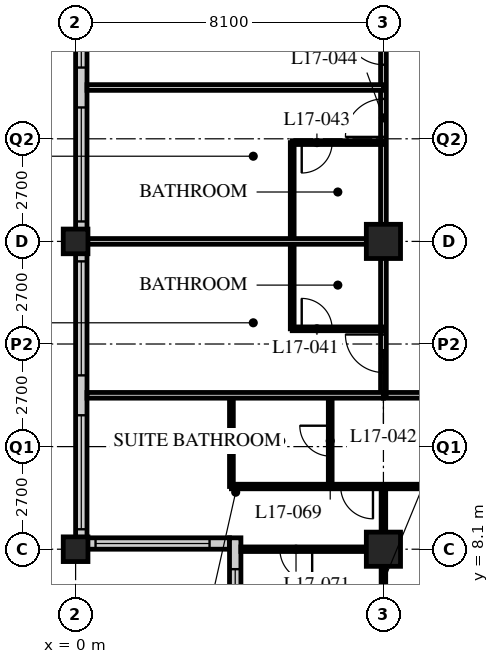
"""IFC4 building model, lengths in metres.
Left out: names, types, materials, properties, quantities, classifications, styles, units other than length and angle.
Written with IfcOpenShell. Run it as: python <this file> out.ifc"""

import sys

from ifc_helpers import new_model, si_unit, direction, frame, frame_2d, origin, origin_2d, place, context, subcontext, project, spatial, rectangle, hollow_rectangle, extrude, element, fill, save


model = new_model("IFC4")
c1 = context("Model", 3, precision=1e-05, world=origin(), true_north=direction((0.0, 1.0)))
c2 = subcontext(c1, "Body", "Model", "MODEL_VIEW")
j1 = project(units=[si_unit("LENGTHUNIT", "METRE"), si_unit("PLANEANGLEUNIT", "RADIAN")], contexts=[c1])
p1 = place(None, origin())
s1 = spatial("IfcSite", under=j1, at=p1, CompositionType="ELEMENT")
p2 = place(p1, origin())
s2 = spatial("IfcBuilding", under=s1, at=p2, CompositionType="ELEMENT")
p3 = place(p2, frame((0.0, 0.0, 70.4)))
s3 = spatial("IfcBuildingStorey", under=s2, at=p3, CompositionType="ELEMENT", Elevation=70.4)
for number, where, z_axis, x_axis in (
    (1, (0.0, 8.1, 0.0), (0.0, 0.0, 1.0), (1.0, 0.0, 0.0)),
    (2, (0.0, 16.2, 0.0), (0.0, 0.0, 1.0), (1.0, 0.0, 0.0)),
):
    element("IfcColumn", number, at=place(p3, frame(where, z_axis=z_axis, x_axis=x_axis)), inside=s3, PredefinedType="COLUMN", context=c2, shape_type="SweptSolid", body=[
        extrude(hollow_rectangle(XDim=0.65, YDim=0.65, WallThickness=0.05, at=origin_2d()), origin(), (0.0, 0.0, 1.0), 3.4),
    ])
for number, where, z_axis, x_axis in (
    (3, (8.1, 8.1, 0.0), (0.0, 0.0, 1.0), (1.0, 0.0, 0.0)),
    (4, (8.1, 16.2, 0.0), (0.0, 0.0, 1.0), (1.0, 0.0, 0.0)),
):
    element("IfcColumn", number, at=place(p3, frame(where, z_axis=z_axis, x_axis=x_axis)), inside=s3, PredefinedType="COLUMN", context=c2, shape_type="SweptSolid", body=[
        extrude(hollow_rectangle(XDim=0.9, YDim=0.9, WallThickness=0.09, at=origin_2d()), origin(), (0.0, 0.0, 1.0), 3.4),
    ])
p4 = place(p3, frame((0.15, 40.2, 0.0), z_axis=(0.0, 0.0, 1.0), x_axis=(0.0, -1.0, 0.0)))
e5 = element("IfcWall", 5, at=p4, inside=s3, PredefinedType="SOLIDWALL", context=c2, shape_type="SweptSolid", body=[
    extrude(rectangle(XDim=32.1, YDim=0.3, at=frame_2d((16.05, 0.0))), origin(), (0.0, 0.0, 1.0), 3.19),
])
p5 = place(p4, frame((0.225, 0.0, 0.9)))
e6 = element("IfcOpeningElement", 6, at=p5, cuts=e5, PredefinedType="OPENING", context=c2, shape_type="SweptSolid", body=[
    extrude(rectangle(XDim=3.0, YDim=2.0, at=frame_2d((1.5, 1.0))), frame((0.0, 0.16, 0.0), z_axis=(0.0, -1.0, 0.0), x_axis=(1.0, 0.0, 0.0)), (0.0, 0.0, 1.0), 0.32),
])
p6 = place(p4, frame((4.275, 0.0, 0.9)))
e7 = element("IfcOpeningElement", 7, at=p6, cuts=e5, PredefinedType="OPENING", context=c2, shape_type="SweptSolid", body=[
    extrude(rectangle(XDim=3.0, YDim=2.0, at=frame_2d((1.5, 1.0))), frame((0.0, 0.16, 0.0), z_axis=(0.0, -1.0, 0.0), x_axis=(1.0, 0.0, 0.0)), (0.0, 0.0, 1.0), 0.32),
])
p7 = place(p4, frame((8.325, 0.0, 0.9)))
e8 = element("IfcOpeningElement", 8, at=p7, cuts=e5, PredefinedType="OPENING", context=c2, shape_type="SweptSolid", body=[
    extrude(rectangle(XDim=3.0, YDim=2.0, at=frame_2d((1.5, 1.0))), frame((0.0, 0.16, 0.0), z_axis=(0.0, -1.0, 0.0), x_axis=(1.0, 0.0, 0.0)), (0.0, 0.0, 1.0), 0.32),
])
p8 = place(p4, frame((12.375, 0.0, 0.9)))
e9 = element("IfcOpeningElement", 9, at=p8, cuts=e5, PredefinedType="OPENING", context=c2, shape_type="SweptSolid", body=[
    extrude(rectangle(XDim=3.0, YDim=2.0, at=frame_2d((1.5, 1.0))), frame((0.0, 0.16, 0.0), z_axis=(0.0, -1.0, 0.0), x_axis=(1.0, 0.0, 0.0)), (0.0, 0.0, 1.0), 0.32),
])
p9 = place(p4, frame((16.425, 0.0, 0.9)))
e10 = element("IfcOpeningElement", 10, at=p9, cuts=e5, PredefinedType="OPENING", context=c2, shape_type="SweptSolid", body=[
    extrude(rectangle(XDim=3.0, YDim=2.0, at=frame_2d((1.5, 1.0))), frame((0.0, 0.16, 0.0), z_axis=(0.0, -1.0, 0.0), x_axis=(1.0, 0.0, 0.0)), (0.0, 0.0, 1.0), 0.32),
])
p10 = place(p4, frame((20.475, 0.0, 0.9)))
e11 = element("IfcOpeningElement", 11, at=p10, cuts=e5, PredefinedType="OPENING", context=c2, shape_type="SweptSolid", body=[
    extrude(rectangle(XDim=3.0, YDim=2.0, at=frame_2d((1.5, 1.0))), frame((0.0, 0.16, 0.0), z_axis=(0.0, -1.0, 0.0), x_axis=(1.0, 0.0, 0.0)), (0.0, 0.0, 1.0), 0.32),
])
p11 = place(p4, frame((24.525, 0.0, 0.9)))
e12 = element("IfcOpeningElement", 12, at=p11, cuts=e5, PredefinedType="OPENING", context=c2, shape_type="SweptSolid", body=[
    extrude(rectangle(XDim=3.0, YDim=2.0, at=frame_2d((1.5, 1.0))), frame((0.0, 0.16, 0.0), z_axis=(0.0, -1.0, 0.0), x_axis=(1.0, 0.0, 0.0)), (0.0, 0.0, 1.0), 0.32),
])
p12 = place(p4, frame((28.575, 0.0, 0.9)))
e13 = element("IfcOpeningElement", 13, at=p12, cuts=e5, PredefinedType="OPENING", context=c2, shape_type="SweptSolid", body=[
    extrude(rectangle(XDim=3.0, YDim=2.0, at=frame_2d((1.5, 1.0))), frame((0.0, 0.16, 0.0), z_axis=(0.0, -1.0, 0.0), x_axis=(1.0, 0.0, 0.0)), (0.0, 0.0, 1.0), 0.32),
])
p13 = place(p3, frame((0.3, 8.25, 0.0), z_axis=(0.0, 0.0, 1.0), x_axis=(1.0, 0.0, 0.0)))
e14 = element("IfcWall", 14, at=p13, inside=s3, PredefinedType="SOLIDWALL", context=c2, shape_type="SweptSolid", body=[
    extrude(rectangle(XDim=3.75, YDim=0.3, at=frame_2d((1.875, 0.0))), origin(), (0.0, 0.0, 1.0), 3.19),
])
p14 = place(p13, frame((0.225, 0.0, 0.9)))
e15 = element("IfcOpeningElement", 15, at=p14, cuts=e14, PredefinedType="OPENING", context=c2, shape_type="SweptSolid", body=[
    extrude(rectangle(XDim=3.0, YDim=1.5, at=frame_2d((1.5, 0.75))), frame((0.0, 0.16, 0.0), z_axis=(0.0, -1.0, 0.0), x_axis=(1.0, 0.0, 0.0)), (0.0, 0.0, 1.0), 0.32),
])
p15 = place(p3, frame((4.2, 8.4, 0.0), z_axis=(0.0, 0.0, 1.0), x_axis=(0.0, -1.0, 0.0)))
e16 = element("IfcWall", 16, at=p15, inside=s3, PredefinedType="SOLIDWALL", context=c2, shape_type="SweptSolid", body=[
    extrude(rectangle(XDim=4.35, YDim=0.3, at=frame_2d((2.175, 0.0))), origin(), (0.0, 0.0, 1.0), 3.19),
])
p16 = place(p15, frame((0.825, 0.0, 0.9)))
e17 = element("IfcOpeningElement", 17, at=p16, cuts=e16, PredefinedType="OPENING", context=c2, shape_type="SweptSolid", body=[
    extrude(rectangle(XDim=3.0, YDim=1.5, at=frame_2d((1.5, 0.75))), frame((0.0, 0.16, 0.0), z_axis=(0.0, -1.0, 0.0), x_axis=(1.0, 0.0, 0.0)), (0.0, 0.0, 1.0), 0.32),
])
p17 = place(p3, frame((8.1, 12.15, 0.0), z_axis=(0.0, 0.0, 1.0), x_axis=(1.0, 0.0, 0.0)))
e18 = element("IfcWall", 18, at=p17, inside=s3, PredefinedType="PARTITIONING", context=c2, shape_type="SweptSolid", body=[
    extrude(rectangle(XDim=36.45, YDim=0.15, at=frame_2d((18.225, 0.0))), origin(), (0.0, 0.0, 1.0), 3.19),
])
p18 = place(p17, frame((4.35, 0.0, 0.0)))
e19 = element("IfcOpeningElement", 19, at=p18, cuts=e18, PredefinedType="OPENING", context=c2, shape_type="SweptSolid", body=[
    extrude(rectangle(XDim=1.0, YDim=2.1, at=frame_2d((0.5, 1.05))), frame((0.0, 0.085, 0.0), z_axis=(0.0, -1.0, 0.0), x_axis=(1.0, 0.0, 0.0)), (0.0, 0.0, 1.0), 0.17),
])
p19 = place(p17, frame((10.55, 0.0, 0.0)))
e20 = element("IfcOpeningElement", 20, at=p19, cuts=e18, PredefinedType="OPENING", context=c2, shape_type="SweptSolid", body=[
    extrude(rectangle(XDim=1.0, YDim=2.1, at=frame_2d((0.5, 1.05))), frame((0.0, 0.085, 0.0), z_axis=(0.0, -1.0, 0.0), x_axis=(1.0, 0.0, 0.0)), (0.0, 0.0, 1.0), 0.17),
])
p20 = place(p17, frame((14.6, 0.0, 0.0)))
e21 = element("IfcOpeningElement", 21, at=p20, cuts=e18, PredefinedType="OPENING", context=c2, shape_type="SweptSolid", body=[
    extrude(rectangle(XDim=1.0, YDim=2.1, at=frame_2d((0.5, 1.05))), frame((0.0, 0.085, 0.0), z_axis=(0.0, -1.0, 0.0), x_axis=(1.0, 0.0, 0.0)), (0.0, 0.0, 1.0), 0.17),
])
p21 = place(p17, frame((18.65, 0.0, 0.0)))
e22 = element("IfcOpeningElement", 22, at=p21, cuts=e18, PredefinedType="OPENING", context=c2, shape_type="SweptSolid", body=[
    extrude(rectangle(XDim=1.0, YDim=2.1, at=frame_2d((0.5, 1.05))), frame((0.0, 0.085, 0.0), z_axis=(0.0, -1.0, 0.0), x_axis=(1.0, 0.0, 0.0)), (0.0, 0.0, 1.0), 0.17),
])
p22 = place(p17, frame((22.7, 0.0, 0.0)))
e23 = element("IfcOpeningElement", 23, at=p22, cuts=e18, PredefinedType="OPENING", context=c2, shape_type="SweptSolid", body=[
    extrude(rectangle(XDim=1.0, YDim=2.1, at=frame_2d((0.5, 1.05))), frame((0.0, 0.085, 0.0), z_axis=(0.0, -1.0, 0.0), x_axis=(1.0, 0.0, 0.0)), (0.0, 0.0, 1.0), 0.17),
])
p23 = place(p17, frame((24.6, 0.0, 0.0)))
e24 = element("IfcOpeningElement", 24, at=p23, cuts=e18, PredefinedType="OPENING", context=c2, shape_type="SweptSolid", body=[
    extrude(rectangle(XDim=1.0, YDim=2.1, at=frame_2d((0.5, 1.05))), frame((0.0, 0.085, 0.0), z_axis=(0.0, -1.0, 0.0), x_axis=(1.0, 0.0, 0.0)), (0.0, 0.0, 1.0), 0.17),
])
p24 = place(p17, frame((30.8, 0.0, 0.0)))
e25 = element("IfcOpeningElement", 25, at=p24, cuts=e18, PredefinedType="OPENING", context=c2, shape_type="SweptSolid", body=[
    extrude(rectangle(XDim=1.0, YDim=2.1, at=frame_2d((0.5, 1.05))), frame((0.0, 0.085, 0.0), z_axis=(0.0, -1.0, 0.0), x_axis=(1.0, 0.0, 0.0)), (0.0, 0.0, 1.0), 0.17),
])
p25 = place(p17, frame((1.525, 0.0, 0.0)))
e26 = element("IfcOpeningElement", 26, at=p25, cuts=e18, PredefinedType="OPENING", context=c2, shape_type="SweptSolid", body=[
    extrude(rectangle(XDim=1.0, YDim=2.1, at=frame_2d((0.5, 1.05))), frame((0.0, 0.085, 0.0), z_axis=(0.0, -1.0, 0.0), x_axis=(1.0, 0.0, 0.0)), (0.0, 0.0, 1.0), 0.17),
])
p26 = place(p17, frame((33.925, 0.0, 0.0)))
e27 = element("IfcOpeningElement", 27, at=p26, cuts=e18, PredefinedType="OPENING", context=c2, shape_type="SweptSolid", body=[
    extrude(rectangle(XDim=1.0, YDim=2.1, at=frame_2d((0.5, 1.05))), frame((0.0, 0.085, 0.0), z_axis=(0.0, -1.0, 0.0), x_axis=(1.0, 0.0, 0.0)), (0.0, 0.0, 1.0), 0.17),
])
p27 = place(p3, frame((8.1, 12.15, 0.0), z_axis=(0.0, 0.0, 1.0), x_axis=(0.0, 1.0, 0.0)))
e28 = element("IfcWall", 28, at=p27, inside=s3, PredefinedType="PARTITIONING", context=c2, shape_type="SweptSolid", body=[
    extrude(rectangle(XDim=30.15, YDim=0.15, at=frame_2d((15.075, 0.0))), origin(), (0.0, 0.0, 1.0), 2.578),
])
p28 = place(p27, frame((0.6, 0.0, 0.0)))
e29 = element("IfcOpeningElement", 29, at=p28, cuts=e28, PredefinedType="OPENING", context=c2, shape_type="SweptSolid", body=[
    extrude(rectangle(XDim=1.0, YDim=2.1, at=frame_2d((0.5, 1.05))), frame((0.0, 0.085, 0.0), z_axis=(0.0, -1.0, 0.0), x_axis=(1.0, 0.0, 0.0)), (0.0, 0.0, 1.0), 0.17),
])
p29 = place(p27, frame((6.8, 0.0, 0.0)))
e30 = element("IfcOpeningElement", 30, at=p29, cuts=e28, PredefinedType="OPENING", context=c2, shape_type="SweptSolid", body=[
    extrude(rectangle(XDim=1.0, YDim=2.1, at=frame_2d((0.5, 1.05))), frame((0.0, 0.085, 0.0), z_axis=(0.0, -1.0, 0.0), x_axis=(1.0, 0.0, 0.0)), (0.0, 0.0, 1.0), 0.17),
])
p30 = place(p27, frame((8.7, 0.0, 0.0)))
e31 = element("IfcOpeningElement", 31, at=p30, cuts=e28, PredefinedType="OPENING", context=c2, shape_type="SweptSolid", body=[
    extrude(rectangle(XDim=1.0, YDim=2.1, at=frame_2d((0.5, 1.05))), frame((0.0, 0.085, 0.0), z_axis=(0.0, -1.0, 0.0), x_axis=(1.0, 0.0, 0.0)), (0.0, 0.0, 1.0), 0.17),
])
p31 = place(p27, frame((14.6, 0.0, 0.0)))
e32 = element("IfcOpeningElement", 32, at=p31, cuts=e28, PredefinedType="OPENING", context=c2, shape_type="SweptSolid", body=[
    extrude(rectangle(XDim=1.0, YDim=2.1, at=frame_2d((0.5, 1.05))), frame((0.0, 0.085, 0.0), z_axis=(0.0, -1.0, 0.0), x_axis=(1.0, 0.0, 0.0)), (0.0, 0.0, 1.0), 0.17),
])
p32 = place(p27, frame((21.65, 0.0, 0.0)))
e33 = element("IfcOpeningElement", 33, at=p32, cuts=e28, PredefinedType="OPENING", context=c2, shape_type="SweptSolid", body=[
    extrude(rectangle(XDim=1.0, YDim=2.1, at=frame_2d((0.5, 1.05))), frame((0.0, 0.085, 0.0), z_axis=(0.0, -1.0, 0.0), x_axis=(1.0, 0.0, 0.0)), (0.0, 0.0, 1.0), 0.17),
])
p33 = place(p27, frame((26.75, 0.0, 0.0)))
e34 = element("IfcOpeningElement", 34, at=p33, cuts=e28, PredefinedType="OPENING", context=c2, shape_type="SweptSolid", body=[
    extrude(rectangle(XDim=1.0, YDim=2.1, at=frame_2d((0.5, 1.05))), frame((0.0, 0.085, 0.0), z_axis=(0.0, -1.0, 0.0), x_axis=(1.0, 0.0, 0.0)), (0.0, 0.0, 1.0), 0.17),
])
p34 = place(p3, frame((5.7, 13.9, 0.0), z_axis=(0.0, 0.0, 1.0), x_axis=(0.0, 1.0, 0.0)))
e35 = element("IfcWall", 35, at=p34, inside=s3, PredefinedType="PARTITIONING", context=c2, shape_type="SweptSolid", body=[
    extrude(rectangle(XDim=4.9, YDim=0.1, at=frame_2d((2.45, 0.0))), origin(), (0.0, 0.0, 1.0), 3.19),
])
p35 = place(p3, frame((8.1, 13.9, 0.0), z_axis=(0.0, 0.0, 1.0), x_axis=(-1.0, 0.0, 0.0)))
e36 = element("IfcWall", 36, at=p35, inside=s3, PredefinedType="PARTITIONING", context=c2, shape_type="SweptSolid", body=[
    extrude(rectangle(XDim=2.4, YDim=0.1, at=frame_2d((1.2, 0.0))), origin(), (0.0, 0.0, 1.0), 3.19),
])
p36 = place(p35, frame((1.35, 0.0, 0.0)))
e37 = element("IfcOpeningElement", 37, at=p36, cuts=e36, PredefinedType="OPENING", context=c2, shape_type="SweptSolid", body=[
    extrude(rectangle(XDim=0.8, YDim=2.1, at=frame_2d((0.4, 1.05))), frame((0.0, 0.06, 0.0), z_axis=(0.0, -1.0, 0.0), x_axis=(1.0, 0.0, 0.0)), (0.0, 0.0, 1.0), 0.12),
])
p37 = place(p3, frame((8.1, 16.2, 0.0), z_axis=(0.0, 0.0, 1.0), x_axis=(-1.0, 0.0, 0.0)))
e38 = element("IfcWall", 38, at=p37, inside=s3, PredefinedType="PARTITIONING", context=c2, shape_type="SweptSolid", body=[
    extrude(rectangle(XDim=7.8, YDim=0.15, at=frame_2d((3.9, 0.0))), origin(), (0.0, 0.0, 1.0), 2.578),
])
p38 = place(p3, frame((8.1, 18.8, 0.0), z_axis=(0.0, 0.0, 1.0), x_axis=(-1.0, 0.0, 0.0)))
e39 = element("IfcWall", 39, at=p38, inside=s3, PredefinedType="PARTITIONING", context=c2, shape_type="SweptSolid", body=[
    extrude(rectangle(XDim=2.4, YDim=0.1, at=frame_2d((1.2, 0.0))), origin(), (0.0, 0.0, 1.0), 3.19),
])
p39 = place(p38, frame((1.35, 0.0, 0.0)))
e40 = element("IfcOpeningElement", 40, at=p39, cuts=e39, PredefinedType="OPENING", context=c2, shape_type="SweptSolid", body=[
    extrude(rectangle(XDim=0.8, YDim=2.1, at=frame_2d((0.4, 1.05))), frame((0.0, 0.06, 0.0), z_axis=(0.0, -1.0, 0.0), x_axis=(1.0, 0.0, 0.0)), (0.0, 0.0, 1.0), 0.12),
])
p40 = place(p3, frame((8.1, 20.25, 0.0), z_axis=(0.0, 0.0, 1.0), x_axis=(-1.0, 0.0, 0.0)))
e41 = element("IfcWall", 41, at=p40, inside=s3, PredefinedType="PARTITIONING", context=c2, shape_type="SweptSolid", body=[
    extrude(rectangle(XDim=7.8, YDim=0.15, at=frame_2d((3.9, 0.0))), origin(), (0.0, 0.0, 1.0), 3.19),
])
p41 = place(p3, frame((6.7, 12.15, 0.0), z_axis=(0.0, 0.0, 1.0), x_axis=(0.0, -1.0, 0.0)))
e42 = element("IfcWall", 42, at=p41, inside=s3, PredefinedType="PARTITIONING", context=c2, shape_type="SweptSolid", body=[
    extrude(rectangle(XDim=2.4, YDim=0.1, at=frame_2d((1.2, 0.0))), origin(), (0.0, 0.0, 1.0), 3.19),
])
p42 = place(p41, frame((0.8, 0.0, 0.0)))
e43 = element("IfcOpeningElement", 43, at=p42, cuts=e42, PredefinedType="OPENING", context=c2, shape_type="SweptSolid", body=[
    extrude(rectangle(XDim=0.8, YDim=2.1, at=frame_2d((0.4, 1.05))), frame((0.0, 0.06, 0.0), z_axis=(0.0, -1.0, 0.0), x_axis=(1.0, 0.0, 0.0)), (0.0, 0.0, 1.0), 0.12),
])
p43 = place(p3, frame((4.1, 12.15, 0.0), z_axis=(0.0, 0.0, 1.0), x_axis=(0.0, -1.0, 0.0)))
e44 = element("IfcWall", 44, at=p43, inside=s3, PredefinedType="PARTITIONING", context=c2, shape_type="SweptSolid", body=[
    extrude(rectangle(XDim=2.4, YDim=0.1, at=frame_2d((1.2, 0.0))), origin(), (0.0, 0.0, 1.0), 3.19),
])
p44 = place(p3, frame((4.1, 9.75, 0.0), z_axis=(0.0, 0.0, 1.0), x_axis=(1.0, 0.0, 0.0)))
e45 = element("IfcWall", 45, at=p44, inside=s3, PredefinedType="PARTITIONING", context=c2, shape_type="SweptSolid", body=[
    extrude(rectangle(XDim=8.05, YDim=0.12, at=frame_2d((4.025, 0.0))), origin(), (0.0, 0.0, 1.0), 3.19),
])
p45 = place(p44, frame((6.725, 0.0, 0.0)))
e46 = element("IfcOpeningElement", 46, at=p45, cuts=e45, PredefinedType="OPENING", context=c2, shape_type="SweptSolid", body=[
    extrude(rectangle(XDim=0.85, YDim=2.1, at=frame_2d((0.425, 1.05))), frame((0.0, 0.07, 0.0), z_axis=(0.0, -1.0, 0.0), x_axis=(1.0, 0.0, 0.0)), (0.0, 0.0, 1.0), 0.14),
])
p46 = place(p44, frame((2.875, 0.0, 0.0)))
e47 = element("IfcOpeningElement", 47, at=p46, cuts=e45, PredefinedType="OPENING", context=c2, shape_type="SweptSolid", body=[
    extrude(rectangle(XDim=0.85, YDim=2.1, at=frame_2d((0.425, 1.05))), frame((0.0, 0.07, 0.0), z_axis=(0.0, -1.0, 0.0), x_axis=(1.0, 0.0, 0.0)), (0.0, 0.0, 1.0), 0.14),
])
p47 = place(p3, frame((8.1, 9.75, 0.0), z_axis=(0.0, 0.0, 1.0), x_axis=(0.0, -1.0, 0.0)))
e48 = element("IfcWall", 48, at=p47, inside=s3, PredefinedType="PARTITIONING", context=c2, shape_type="SweptSolid", body=[
    extrude(rectangle(XDim=5.4, YDim=0.12, at=frame_2d((2.7, 0.0))), origin(), (0.0, 0.0, 1.0), 2.578),
])
p48 = place(p3, frame((8.1, 8.1, 0.0), z_axis=(0.0, 0.0, 1.0), x_axis=(-1.0, 0.0, 0.0)))
e49 = element("IfcWall", 49, at=p48, inside=s3, PredefinedType="PARTITIONING", context=c2, shape_type="SweptSolid", body=[
    extrude(rectangle(XDim=3.75, YDim=0.12, at=frame_2d((1.875, 0.0))), origin(), (0.0, 0.0, 1.0), 2.578),
])
p49 = place(p48, frame((1.875, 0.0, 0.0)))
e50 = element("IfcOpeningElement", 50, at=p49, cuts=e49, PredefinedType="OPENING", context=c2, shape_type="SweptSolid", body=[
    extrude(rectangle(XDim=0.85, YDim=2.1, at=frame_2d((0.425, 1.05))), frame((0.0, 0.07, 0.0), z_axis=(0.0, -1.0, 0.0), x_axis=(1.0, 0.0, 0.0)), (0.0, 0.0, 1.0), 0.14),
])
p50 = place(p3, frame((0.3, 12.15, 0.0), z_axis=(0.0, 0.0, 1.0), x_axis=(1.0, 0.0, 0.0)))
e51 = element("IfcWall", 51, at=p50, inside=s3, PredefinedType="PARTITIONING", context=c2, shape_type="SweptSolid", body=[
    extrude(rectangle(XDim=7.8, YDim=0.15, at=frame_2d((3.9, 0.0))), origin(), (0.0, 0.0, 1.0), 3.19),
])
p51 = place(p9, origin())
e52 = element("IfcWindow", 52, at=p51, inside=s3, PartitioningType="SINGLE_PANEL", PredefinedType="WINDOW", context=c2, shape_type="SweptSolid", body=[
    extrude(rectangle(XDim=3.0, YDim=2.0, at=frame_2d((1.5, 1.0))), frame((0.0, 0.03, 0.0), z_axis=(0.0, -1.0, 0.0), x_axis=(1.0, 0.0, 0.0)), (0.0, 0.0, 1.0), 0.06),
])
fill(e10, e52)
p52 = place(p10, origin())
e53 = element("IfcWindow", 53, at=p52, inside=s3, PartitioningType="SINGLE_PANEL", PredefinedType="WINDOW", context=c2, shape_type="SweptSolid", body=[
    extrude(rectangle(XDim=3.0, YDim=2.0, at=frame_2d((1.5, 1.0))), frame((0.0, 0.03, 0.0), z_axis=(0.0, -1.0, 0.0), x_axis=(1.0, 0.0, 0.0)), (0.0, 0.0, 1.0), 0.06),
])
fill(e11, e53)
p53 = place(p11, origin())
e54 = element("IfcWindow", 54, at=p53, inside=s3, PartitioningType="SINGLE_PANEL", PredefinedType="WINDOW", context=c2, shape_type="SweptSolid", body=[
    extrude(rectangle(XDim=3.0, YDim=2.0, at=frame_2d((1.5, 1.0))), frame((0.0, 0.03, 0.0), z_axis=(0.0, -1.0, 0.0), x_axis=(1.0, 0.0, 0.0)), (0.0, 0.0, 1.0), 0.06),
])
fill(e12, e54)
p54 = place(p12, origin())
e55 = element("IfcWindow", 55, at=p54, inside=s3, PartitioningType="SINGLE_PANEL", PredefinedType="WINDOW", context=c2, shape_type="SweptSolid", body=[
    extrude(rectangle(XDim=3.0, YDim=2.0, at=frame_2d((1.5, 1.0))), frame((0.0, 0.03, 0.0), z_axis=(0.0, -1.0, 0.0), x_axis=(1.0, 0.0, 0.0)), (0.0, 0.0, 1.0), 0.06),
])
fill(e13, e55)
p55 = place(p14, origin())
e56 = element("IfcWindow", 56, at=p55, inside=s3, PartitioningType="SINGLE_PANEL", PredefinedType="WINDOW", context=c2, shape_type="SweptSolid", body=[
    extrude(rectangle(XDim=3.0, YDim=1.5, at=frame_2d((1.5, 0.75))), frame((0.0, 0.03, 0.0), z_axis=(0.0, -1.0, 0.0), x_axis=(1.0, 0.0, 0.0)), (0.0, 0.0, 1.0), 0.06),
])
fill(e15, e56)
p56 = place(p16, origin())
e57 = element("IfcWindow", 57, at=p56, inside=s3, PartitioningType="SINGLE_PANEL", PredefinedType="WINDOW", context=c2, shape_type="SweptSolid", body=[
    extrude(rectangle(XDim=3.0, YDim=1.5, at=frame_2d((1.5, 0.75))), frame((0.0, 0.03, 0.0), z_axis=(0.0, -1.0, 0.0), x_axis=(1.0, 0.0, 0.0)), (0.0, 0.0, 1.0), 0.06),
])
fill(e17, e57)
p57 = place(p36, origin())
e58 = element("IfcDoor", 58, at=p57, inside=s3, OperationType="SINGLE_SWING_LEFT", PredefinedType="DOOR", context=c2, shape_type="SweptSolid", body=[
    extrude(rectangle(XDim=0.8, YDim=2.1, at=frame_2d((0.4, 1.05))), frame((0.0, 0.025, 0.0), z_axis=(0.0, -1.0, 0.0), x_axis=(1.0, 0.0, 0.0)), (0.0, 0.0, 1.0), 0.05),
])
fill(e37, e58)
p58 = place(p28, origin())
e59 = element("IfcDoor", 59, at=p58, inside=s3, OperationType="SINGLE_SWING_RIGHT", PredefinedType="DOOR", context=c2, shape_type="SweptSolid", body=[
    extrude(rectangle(XDim=1.0, YDim=2.1, at=frame_2d((0.5, 1.05))), frame((0.0, 0.025, 0.0), z_axis=(0.0, -1.0, 0.0), x_axis=(1.0, 0.0, 0.0)), (0.0, 0.0, 1.0), 0.05),
])
fill(e29, e59)
p59 = place(p39, origin())
e60 = element("IfcDoor", 60, at=p59, inside=s3, OperationType="SINGLE_SWING_RIGHT", PredefinedType="DOOR", context=c2, shape_type="SweptSolid", body=[
    extrude(rectangle(XDim=0.8, YDim=2.1, at=frame_2d((0.4, 1.05))), frame((0.0, 0.025, 0.0), z_axis=(0.0, -1.0, 0.0), x_axis=(1.0, 0.0, 0.0)), (0.0, 0.0, 1.0), 0.05),
])
fill(e40, e60)
p60 = place(p29, origin())
e61 = element("IfcDoor", 61, at=p60, inside=s3, OperationType="SINGLE_SWING_LEFT", PredefinedType="DOOR", context=c2, shape_type="SweptSolid", body=[
    extrude(rectangle(XDim=1.0, YDim=2.1, at=frame_2d((0.5, 1.05))), frame((0.0, 0.025, 0.0), z_axis=(0.0, -1.0, 0.0), x_axis=(1.0, 0.0, 0.0)), (0.0, 0.0, 1.0), 0.05),
])
fill(e30, e61)
p61 = place(p30, origin())
e62 = element("IfcDoor", 62, at=p61, inside=s3, OperationType="SINGLE_SWING_RIGHT", PredefinedType="DOOR", context=c2, shape_type="SweptSolid", body=[
    extrude(rectangle(XDim=1.0, YDim=2.1, at=frame_2d((0.5, 1.05))), frame((0.0, 0.025, 0.0), z_axis=(0.0, -1.0, 0.0), x_axis=(1.0, 0.0, 0.0)), (0.0, 0.0, 1.0), 0.05),
])
fill(e31, e62)
p62 = place(p42, origin())
e63 = element("IfcDoor", 63, at=p62, inside=s3, OperationType="SINGLE_SWING_RIGHT", PredefinedType="DOOR", context=c2, shape_type="SweptSolid", body=[
    extrude(rectangle(XDim=0.8, YDim=2.1, at=frame_2d((0.4, 1.05))), frame((0.0, 0.025, 0.0), z_axis=(0.0, -1.0, 0.0), x_axis=(1.0, 0.0, 0.0)), (0.0, 0.0, 1.0), 0.05),
])
fill(e43, e63)
p63 = place(p46, origin())
e64 = element("IfcDoor", 64, at=p63, inside=s3, OperationType="SINGLE_SWING_LEFT", PredefinedType="DOOR", context=c2, shape_type="SweptSolid", body=[
    extrude(rectangle(XDim=0.85, YDim=2.1, at=frame_2d((0.425, 1.05))), frame((0.0, 0.025, 0.0), z_axis=(0.0, -1.0, 0.0), x_axis=(1.0, 0.0, 0.0)), (0.0, 0.0, 1.0), 0.05),
])
fill(e47, e64)
p64 = place(p49, origin())
e65 = element("IfcDoor", 65, at=p64, inside=s3, OperationType="SINGLE_SWING_LEFT", PredefinedType="DOOR", context=c2, shape_type="SweptSolid", body=[
    extrude(rectangle(XDim=0.85, YDim=2.1, at=frame_2d((0.425, 1.05))), frame((0.0, 0.025, 0.0), z_axis=(0.0, -1.0, 0.0), x_axis=(1.0, 0.0, 0.0)), (0.0, 0.0, 1.0), 0.05),
])
fill(e50, e65)
save(model, sys.argv[1])
